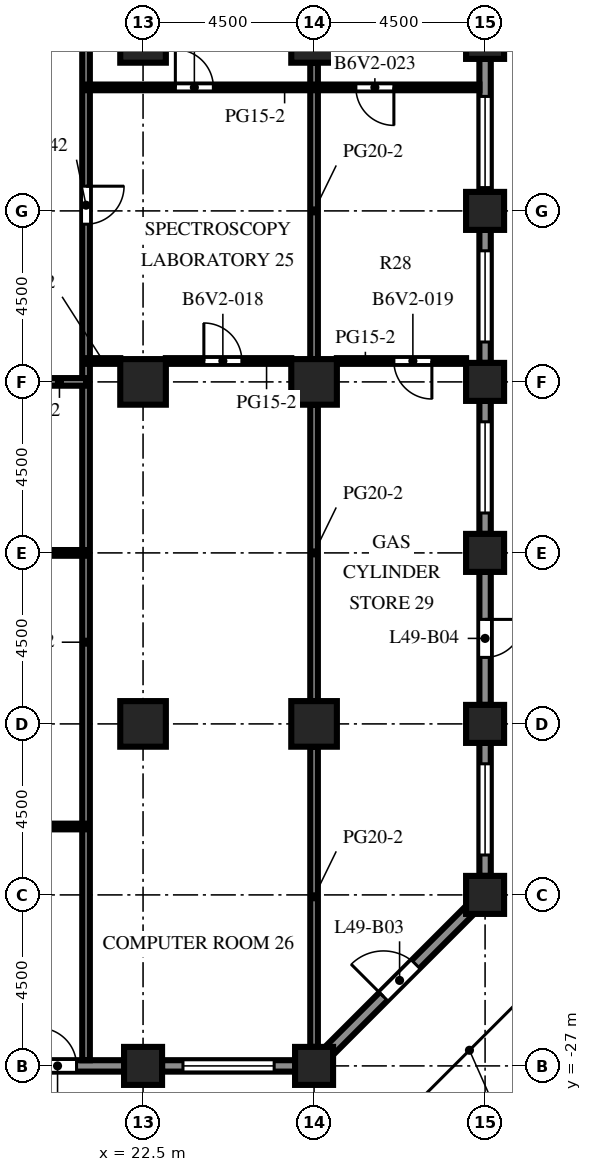
"""IFC4 building model, lengths in metres.
Left out: names, types, materials, properties, quantities, classifications, styles, units other than length and angle.
Written with IfcOpenShell. Run it as: python <this file> out.ifc"""

import sys

from ifc_helpers import new_model, si_unit, direction, frame, frame_2d, origin, origin_2d, place, context, subcontext, project, spatial, rectangle, extrude, element, fill, save


model = new_model("IFC4")
c1 = context("Model", 3, precision=1e-05, world=origin(), true_north=direction((0.0, 1.0)))
c2 = subcontext(c1, "Body", "Model", "MODEL_VIEW")
j1 = project(units=[si_unit("LENGTHUNIT", "METRE"), si_unit("PLANEANGLEUNIT", "RADIAN")], contexts=[c1])
p1 = place(None, origin())
s1 = spatial("IfcSite", under=j1, at=p1, CompositionType="ELEMENT")
p2 = place(p1, origin())
s2 = spatial("IfcBuilding", under=s1, at=p2, CompositionType="ELEMENT")
p3 = place(p2, frame((0.0, 0.0, 216.1)))
s3 = spatial("IfcBuildingStorey", under=s2, at=p3, CompositionType="ELEMENT", Elevation=216.1)
for number, where, z_axis, x_axis in (
    (1, (22.5, -27.0, 0.0), (0.0, 0.0, 1.0), (1.0, 0.0, 0.0)),
    (2, (27.0, -27.0, 0.0), (0.0, 0.0, 1.0), (1.0, 0.0, 0.0)),
    (3, (31.5, -22.5, 0.0), (0.0, 0.0, 1.0), (1.0, 0.0, 0.0)),
    (4, (31.5, -18.0, 0.0), (0.0, 0.0, 1.0), (1.0, 0.0, 0.0)),
    (5, (31.5, -13.5, 0.0), (0.0, 0.0, 1.0), (1.0, 0.0, 0.0)),
    (6, (31.5, -9.0, 0.0), (0.0, 0.0, 1.0), (1.0, 0.0, 0.0)),
    (7, (31.5, -4.5, 0.0), (0.0, 0.0, 1.0), (1.0, 0.0, 0.0)),
    (8, (31.5, 0.0, 0.0), (0.0, 0.0, 1.0), (1.0, 0.0, 0.0)),
):
    element("IfcColumn", number, at=place(p3, frame(where, z_axis=z_axis, x_axis=x_axis)), inside=s3, PredefinedType="COLUMN", context=c2, shape_type="SweptSolid", body=[
        extrude(rectangle(XDim=1.0, YDim=1.0, at=origin_2d()), origin(), (0.0, 0.0, 1.0), 4.1),
    ])
for number, where, z_axis, x_axis in (
    (9, (22.5, -18.0, 0.0), (0.0, 0.0, 1.0), (1.0, 0.0, 0.0)),
    (10, (22.5, -9.0, 0.0), (0.0, 0.0, 1.0), (1.0, 0.0, 0.0)),
    (11, (22.5, 0.0, 0.0), (0.0, 0.0, 1.0), (1.0, 0.0, 0.0)),
    (12, (27.0, -18.0, 0.0), (0.0, 0.0, 1.0), (1.0, 0.0, 0.0)),
    (13, (27.0, -9.0, 0.0), (0.0, 0.0, 1.0), (1.0, 0.0, 0.0)),
    (14, (27.0, 0.0, 0.0), (0.0, 0.0, 1.0), (1.0, 0.0, 0.0)),
):
    element("IfcColumn", number, at=place(p3, frame(where, z_axis=z_axis, x_axis=x_axis)), inside=s3, PredefinedType="COLUMN", context=c2, shape_type="SweptSolid", body=[
        extrude(rectangle(XDim=1.2, YDim=1.2, at=origin_2d()), origin(), (0.0, 0.0, 1.0), 4.1),
    ])
p4 = place(p3, frame((22.0, -27.0, 0.0), z_axis=(0.0, 0.0, 1.0), x_axis=(-1.0, 0.0, 0.0)))
e15 = element("IfcWall", 15, at=p4, inside=s3, PredefinedType="SOLIDWALL", context=c2, shape_type="SweptSolid", body=[
    extrude(rectangle(XDim=3.5, YDim=0.3, at=frame_2d((1.75, 0.0))), origin(), (0.0, 0.0, 1.0), 2.7),
])
p5 = place(p4, frame((1.25, 0.0, 0.0)))
e16 = element("IfcOpeningElement", 16, at=p5, cuts=e15, PredefinedType="OPENING", context=c2, shape_type="SweptSolid", body=[
    extrude(rectangle(XDim=1.0, YDim=2.2, at=frame_2d((0.5, 1.1))), frame((0.0, 0.16, 0.0), z_axis=(0.0, -1.0, 0.0), x_axis=(1.0, 0.0, 0.0)), (0.0, 0.0, 1.0), 0.32),
])
p6 = place(p3, frame((26.5, -27.0, 0.0), z_axis=(0.0, 0.0, 1.0), x_axis=(-1.0, 0.0, 0.0)))
e17 = element("IfcWall", 17, at=p6, inside=s3, PredefinedType="SOLIDWALL", context=c2, shape_type="SweptSolid", body=[
    extrude(rectangle(XDim=3.5, YDim=0.3, at=frame_2d((1.75, 0.0))), origin(), (0.0, 0.0, 1.0), 2.7),
])
p7 = place(p6, frame((0.55, 0.0, 0.8)))
e18 = element("IfcOpeningElement", 18, at=p7, cuts=e17, PredefinedType="OPENING", context=c2, shape_type="SweptSolid", body=[
    extrude(rectangle(XDim=2.4, YDim=1.7, at=frame_2d((1.2, 0.85))), frame((0.0, 0.16, 0.0), z_axis=(0.0, -1.0, 0.0), x_axis=(1.0, 0.0, 0.0)), (0.0, 0.0, 1.0), 0.32),
])
p8 = place(p3, frame((31.106, -22.894, 0.0), z_axis=(0.0, 0.0, 1.0), x_axis=(-0.707106781187, -0.707106781187, 0.0)))
e19 = element("IfcWall", 19, at=p8, inside=s3, PredefinedType="SOLIDWALL", context=c2, shape_type="SweptSolid", body=[
    extrude(rectangle(XDim=5.25, YDim=0.3, at=frame_2d((2.625, 0.0))), origin(), (0.0, 0.0, 1.0), 2.7),
])
p9 = place(p8, frame((2.025, 0.0, 0.0)))
e20 = element("IfcOpeningElement", 20, at=p9, cuts=e19, PredefinedType="OPENING", context=c2, shape_type="SweptSolid", body=[
    extrude(rectangle(XDim=1.2, YDim=2.2, at=frame_2d((0.6, 1.1))), frame((0.0, 0.16, 0.0), z_axis=(0.0, -1.0, 0.0), x_axis=(1.0, 0.0, 0.0)), (0.0, 0.0, 1.0), 0.32),
])
p10 = place(p3, frame((31.5, -18.5, 0.0), z_axis=(0.0, 0.0, 1.0), x_axis=(0.0, -1.0, 0.0)))
e21 = element("IfcWall", 21, at=p10, inside=s3, PredefinedType="SOLIDWALL", context=c2, shape_type="SweptSolid", body=[
    extrude(rectangle(XDim=3.5, YDim=0.3, at=frame_2d((1.75, 0.0))), origin(), (0.0, 0.0, 1.0), 2.7),
])
p11 = place(p10, frame((0.55, 0.0, 0.8)))
e22 = element("IfcOpeningElement", 22, at=p11, cuts=e21, PredefinedType="OPENING", context=c2, shape_type="SweptSolid", body=[
    extrude(rectangle(XDim=2.4, YDim=1.7, at=frame_2d((1.2, 0.85))), frame((0.0, 0.16, 0.0), z_axis=(0.0, -1.0, 0.0), x_axis=(1.0, 0.0, 0.0)), (0.0, 0.0, 1.0), 0.32),
])
p12 = place(p3, frame((31.5, -14.0, 0.0), z_axis=(0.0, 0.0, 1.0), x_axis=(0.0, -1.0, 0.0)))
e23 = element("IfcWall", 23, at=p12, inside=s3, PredefinedType="SOLIDWALL", context=c2, shape_type="SweptSolid", body=[
    extrude(rectangle(XDim=3.5, YDim=0.3, at=frame_2d((1.75, 0.0))), origin(), (0.0, 0.0, 1.0), 2.7),
])
p13 = place(p12, frame((1.25, 0.0, 0.0)))
e24 = element("IfcOpeningElement", 24, at=p13, cuts=e23, PredefinedType="OPENING", context=c2, shape_type="SweptSolid", body=[
    extrude(rectangle(XDim=1.0, YDim=2.2, at=frame_2d((0.5, 1.1))), frame((0.0, 0.16, 0.0), z_axis=(0.0, -1.0, 0.0), x_axis=(1.0, 0.0, 0.0)), (0.0, 0.0, 1.0), 0.32),
])
p14 = place(p3, frame((31.5, -9.5, 0.0), z_axis=(0.0, 0.0, 1.0), x_axis=(0.0, -1.0, 0.0)))
e25 = element("IfcWall", 25, at=p14, inside=s3, PredefinedType="SOLIDWALL", context=c2, shape_type="SweptSolid", body=[
    extrude(rectangle(XDim=3.5, YDim=0.3, at=frame_2d((1.75, 0.0))), origin(), (0.0, 0.0, 1.0), 2.7),
])
p15 = place(p14, frame((0.55, 0.0, 0.8)))
e26 = element("IfcOpeningElement", 26, at=p15, cuts=e25, PredefinedType="OPENING", context=c2, shape_type="SweptSolid", body=[
    extrude(rectangle(XDim=2.4, YDim=1.7, at=frame_2d((1.2, 0.85))), frame((0.0, 0.16, 0.0), z_axis=(0.0, -1.0, 0.0), x_axis=(1.0, 0.0, 0.0)), (0.0, 0.0, 1.0), 0.32),
])
p16 = place(p3, frame((31.5, -5.0, 0.0), z_axis=(0.0, 0.0, 1.0), x_axis=(0.0, -1.0, 0.0)))
e27 = element("IfcWall", 27, at=p16, inside=s3, PredefinedType="SOLIDWALL", context=c2, shape_type="SweptSolid", body=[
    extrude(rectangle(XDim=3.5, YDim=0.3, at=frame_2d((1.75, 0.0))), origin(), (0.0, 0.0, 1.0), 2.7),
])
p17 = place(p16, frame((0.55, 0.0, 0.8)))
e28 = element("IfcOpeningElement", 28, at=p17, cuts=e27, PredefinedType="OPENING", context=c2, shape_type="SweptSolid", body=[
    extrude(rectangle(XDim=2.4, YDim=1.7, at=frame_2d((1.2, 0.85))), frame((0.0, 0.16, 0.0), z_axis=(0.0, -1.0, 0.0), x_axis=(1.0, 0.0, 0.0)), (0.0, 0.0, 1.0), 0.32),
])
p18 = place(p3, frame((31.5, -0.5, 0.0), z_axis=(0.0, 0.0, 1.0), x_axis=(0.0, -1.0, 0.0)))
e29 = element("IfcWall", 29, at=p18, inside=s3, PredefinedType="SOLIDWALL", context=c2, shape_type="SweptSolid", body=[
    extrude(rectangle(XDim=3.5, YDim=0.3, at=frame_2d((1.75, 0.0))), origin(), (0.0, 0.0, 1.0), 2.7),
])
p19 = place(p18, frame((0.988, 0.0, 0.8)))
e30 = element("IfcOpeningElement", 30, at=p19, cuts=e29, PredefinedType="OPENING", context=c2, shape_type="SweptSolid", body=[
    extrude(rectangle(XDim=2.4, YDim=1.7, at=frame_2d((1.2, 0.85))), frame((0.0, 0.16, 0.0), z_axis=(0.0, -1.0, 0.0), x_axis=(1.0, 0.0, 0.0)), (0.0, 0.0, 1.0), 0.32),
])
p20 = place(p3, frame((21.0, 3.25, 0.0), z_axis=(0.0, 0.0, 1.0), x_axis=(0.0, -1.0, 0.0)))
e31 = element("IfcWall", 31, at=p20, inside=s3, PredefinedType="PARTITIONING", context=c2, shape_type="SweptSolid", body=[
    extrude(rectangle(XDim=30.1, YDim=0.2, at=frame_2d((15.05, 0.0))), origin(), (0.0, 0.0, 1.0), 3.5),
])
p21 = place(p20, frame((7.1, 0.0, 0.0)))
e32 = element("IfcOpeningElement", 32, at=p21, cuts=e31, PredefinedType="OPENING", context=c2, shape_type="SweptSolid", body=[
    extrude(rectangle(XDim=1.0, YDim=2.1, at=frame_2d((0.5, 1.05))), frame((0.0, 0.11, 0.0), z_axis=(0.0, -1.0, 0.0), x_axis=(1.0, 0.0, 0.0)), (0.0, 0.0, 1.0), 0.22),
])
p22 = place(p3, frame((27.0, -26.5, 0.0), z_axis=(0.0, 0.0, 1.0), x_axis=(0.0, 1.0, 0.0)))
e33 = element("IfcWall", 33, at=p22, inside=s3, PredefinedType="PARTITIONING", context=c2, shape_type="SweptSolid", body=[
    extrude(rectangle(XDim=7.9, YDim=0.2, at=frame_2d((3.95, 0.0))), origin(), (0.0, 0.0, 1.0), 3.5),
])
for number, where, z_axis, x_axis in (
    (34, (27.0, -17.4, 0.0), (0.0, 0.0, 1.0), (0.0, 1.0, 0.0)),
    (35, (27.0, -8.4, 0.0), (0.0, 0.0, 1.0), (0.0, 1.0, 0.0)),
):
    element("IfcWall", number, at=place(p3, frame(where, z_axis=z_axis, x_axis=x_axis)), inside=s3, PredefinedType="PARTITIONING", context=c2, shape_type="SweptSolid", body=[
        extrude(rectangle(XDim=7.8, YDim=0.2, at=frame_2d((3.9, 0.0))), origin(), (0.0, 0.0, 1.0), 3.5),
    ])
p23 = place(p3, frame((21.0, -20.7, 0.0), z_axis=(0.0, 0.0, 1.0), x_axis=(-1.0, 0.0, 0.0)))
e36 = element("IfcWall", 36, at=p23, inside=s3, PredefinedType="PARTITIONING", context=c2, shape_type="SweptSolid", body=[
    extrude(rectangle(XDim=34.5, YDim=0.15, at=frame_2d((17.25, 0.0))), origin(), (0.0, 0.0, 1.0), 3.5),
])
p24 = place(p23, frame((31.15, 0.0, 0.0)))
e37 = element("IfcOpeningElement", 37, at=p24, cuts=e36, PredefinedType="OPENING", context=c2, shape_type="SweptSolid", body=[
    extrude(rectangle(XDim=1.0, YDim=2.1, at=frame_2d((0.5, 1.05))), frame((0.0, 0.085, 0.0), z_axis=(0.0, -1.0, 0.0), x_axis=(1.0, 0.0, 0.0)), (0.0, 0.0, 1.0), 0.17),
])
p25 = place(p23, frame((25.65, 0.0, 0.0)))
e38 = element("IfcOpeningElement", 38, at=p25, cuts=e36, PredefinedType="OPENING", context=c2, shape_type="SweptSolid", body=[
    extrude(rectangle(XDim=1.0, YDim=2.1, at=frame_2d((0.5, 1.05))), frame((0.0, 0.085, 0.0), z_axis=(0.0, -1.0, 0.0), x_axis=(1.0, 0.0, 0.0)), (0.0, 0.0, 1.0), 0.17),
])
p26 = place(p23, frame((18.65, 0.0, 0.0)))
e39 = element("IfcOpeningElement", 39, at=p26, cuts=e36, PredefinedType="OPENING", context=c2, shape_type="SweptSolid", body=[
    extrude(rectangle(XDim=1.0, YDim=2.1, at=frame_2d((0.5, 1.05))), frame((0.0, 0.085, 0.0), z_axis=(0.0, -1.0, 0.0), x_axis=(1.0, 0.0, 0.0)), (0.0, 0.0, 1.0), 0.17),
])
p27 = place(p23, frame((7.65, 0.0, 0.0)))
e40 = element("IfcOpeningElement", 40, at=p27, cuts=e36, PredefinedType="OPENING", context=c2, shape_type="SweptSolid", body=[
    extrude(rectangle(XDim=1.0, YDim=2.1, at=frame_2d((0.5, 1.05))), frame((0.0, 0.085, 0.0), z_axis=(0.0, -1.0, 0.0), x_axis=(1.0, 0.0, 0.0)), (0.0, 0.0, 1.0), 0.17),
])
p28 = place(p3, frame((21.0, -13.5, 0.0), z_axis=(0.0, 0.0, 1.0), x_axis=(-1.0, 0.0, 0.0)))
e41 = element("IfcWall", 41, at=p28, inside=s3, PredefinedType="PARTITIONING", context=c2, shape_type="SweptSolid", body=[
    extrude(rectangle(XDim=34.5, YDim=0.15, at=frame_2d((17.25, 0.0))), origin(), (0.0, 0.0, 1.0), 3.5),
])
p29 = place(p28, frame((31.4, 0.0, 0.0)))
e42 = element("IfcOpeningElement", 42, at=p29, cuts=e41, PredefinedType="OPENING", context=c2, shape_type="SweptSolid", body=[
    extrude(rectangle(XDim=1.0, YDim=2.1, at=frame_2d((0.5, 1.05))), frame((0.0, 0.085, 0.0), z_axis=(0.0, -1.0, 0.0), x_axis=(1.0, 0.0, 0.0)), (0.0, 0.0, 1.0), 0.17),
])
p30 = place(p28, frame((24.15, 0.0, 0.0)))
e43 = element("IfcOpeningElement", 43, at=p30, cuts=e41, PredefinedType="OPENING", context=c2, shape_type="SweptSolid", body=[
    extrude(rectangle(XDim=1.0, YDim=2.1, at=frame_2d((0.5, 1.05))), frame((0.0, 0.085, 0.0), z_axis=(0.0, -1.0, 0.0), x_axis=(1.0, 0.0, 0.0)), (0.0, 0.0, 1.0), 0.17),
])
p31 = place(p28, frame((17.65, 0.0, 0.0)))
e44 = element("IfcOpeningElement", 44, at=p31, cuts=e41, PredefinedType="OPENING", context=c2, shape_type="SweptSolid", body=[
    extrude(rectangle(XDim=1.0, YDim=2.1, at=frame_2d((0.5, 1.05))), frame((0.0, 0.085, 0.0), z_axis=(0.0, -1.0, 0.0), x_axis=(1.0, 0.0, 0.0)), (0.0, 0.0, 1.0), 0.17),
])
p32 = place(p28, frame((7.65, 0.0, 0.0)))
e45 = element("IfcOpeningElement", 45, at=p32, cuts=e41, PredefinedType="OPENING", context=c2, shape_type="SweptSolid", body=[
    extrude(rectangle(XDim=1.0, YDim=2.1, at=frame_2d((0.5, 1.05))), frame((0.0, 0.085, 0.0), z_axis=(0.0, -1.0, 0.0), x_axis=(1.0, 0.0, 0.0)), (0.0, 0.0, 1.0), 0.17),
])
p33 = place(p3, frame((21.0, -9.0, 0.0), z_axis=(0.0, 0.0, 1.0), x_axis=(-1.0, 0.0, 0.0)))
e46 = element("IfcWall", 46, at=p33, inside=s3, PredefinedType="PARTITIONING", context=c2, shape_type="SweptSolid", body=[
    extrude(rectangle(XDim=3.0, YDim=0.2, at=frame_2d((1.5, 0.0))), origin(), (0.0, 0.0, 1.0), 3.5),
])
p34 = place(p33, frame((1.4, 0.0, 0.0)))
e47 = element("IfcOpeningElement", 47, at=p34, cuts=e46, PredefinedType="OPENING", context=c2, shape_type="SweptSolid", body=[
    extrude(rectangle(XDim=1.0, YDim=2.1, at=frame_2d((0.5, 1.05))), frame((0.0, 0.11, 0.0), z_axis=(0.0, -1.0, 0.0), x_axis=(1.0, 0.0, 0.0)), (0.0, 0.0, 1.0), 0.22),
])
p35 = place(p3, frame((21.0, -8.45, 0.0), z_axis=(0.0, 0.0, 1.0), x_axis=(1.0, 0.0, 0.0)))
e48 = element("IfcWall", 48, at=p35, inside=s3, PredefinedType="PARTITIONING", context=c2, shape_type="SweptSolid", body=[
    extrude(rectangle(XDim=0.9, YDim=0.15, at=frame_2d((0.45, 0.0))), origin(), (0.0, 0.0, 1.0), 3.5),
])
p36 = place(p3, frame((26.4, -8.45, 0.0), z_axis=(0.0, 0.0, 1.0), x_axis=(-1.0, 0.0, 0.0)))
e49 = element("IfcWall", 49, at=p36, inside=s3, PredefinedType="PARTITIONING", context=c2, shape_type="SweptSolid", body=[
    extrude(rectangle(XDim=3.3, YDim=0.15, at=frame_2d((1.65, 0.0))), origin(), (0.0, 0.0, 1.0), 3.5),
])
p37 = place(p36, frame((1.3, 0.0, 0.0)))
e50 = element("IfcOpeningElement", 50, at=p37, cuts=e49, PredefinedType="OPENING", context=c2, shape_type="SweptSolid", body=[
    extrude(rectangle(XDim=1.0, YDim=2.1, at=frame_2d((0.5, 1.05))), frame((0.0, 0.085, 0.0), z_axis=(0.0, -1.0, 0.0), x_axis=(1.0, 0.0, 0.0)), (0.0, 0.0, 1.0), 0.17),
])
p38 = place(p3, frame((31.0, -8.45, 0.0), z_axis=(0.0, 0.0, 1.0), x_axis=(-1.0, 0.0, 0.0)))
e51 = element("IfcWall", 51, at=p38, inside=s3, PredefinedType="PARTITIONING", context=c2, shape_type="SweptSolid", body=[
    extrude(rectangle(XDim=3.4, YDim=0.15, at=frame_2d((1.7, 0.0))), origin(), (0.0, 0.0, 1.0), 3.5),
])
p39 = place(p38, frame((0.9, 0.0, 0.0)))
e52 = element("IfcOpeningElement", 52, at=p39, cuts=e51, PredefinedType="OPENING", context=c2, shape_type="SweptSolid", body=[
    extrude(rectangle(XDim=1.0, YDim=2.1, at=frame_2d((0.5, 1.05))), frame((0.0, 0.085, 0.0), z_axis=(0.0, -1.0, 0.0), x_axis=(1.0, 0.0, 0.0)), (0.0, 0.0, 1.0), 0.17),
])
p40 = place(p3, frame((21.0, -1.25, 0.0), z_axis=(0.0, 0.0, 1.0), x_axis=(1.0, 0.0, 0.0)))
e53 = element("IfcWall", 53, at=p40, inside=s3, PredefinedType="PARTITIONING", context=c2, shape_type="SweptSolid", body=[
    extrude(rectangle(XDim=10.35, YDim=0.15, at=frame_2d((5.175, 0.0))), origin(), (0.0, 0.0, 1.0), 3.5),
])
p41 = place(p40, frame((2.35, 0.0, 0.0)))
e54 = element("IfcOpeningElement", 54, at=p41, cuts=e53, PredefinedType="OPENING", context=c2, shape_type="SweptSolid", body=[
    extrude(rectangle(XDim=1.0, YDim=2.1, at=frame_2d((0.5, 1.05))), frame((0.0, 0.085, 0.0), z_axis=(0.0, -1.0, 0.0), x_axis=(1.0, 0.0, 0.0)), (0.0, 0.0, 1.0), 0.17),
])
p42 = place(p40, frame((7.1, 0.0, 0.0)))
e55 = element("IfcOpeningElement", 55, at=p42, cuts=e53, PredefinedType="OPENING", context=c2, shape_type="SweptSolid", body=[
    extrude(rectangle(XDim=1.0, YDim=2.1, at=frame_2d((0.5, 1.05))), frame((0.0, 0.085, 0.0), z_axis=(0.0, -1.0, 0.0), x_axis=(1.0, 0.0, 0.0)), (0.0, 0.0, 1.0), 0.17),
])
p43 = place(p5, origin())
e56 = element("IfcDoor", 56, at=p43, inside=s3, OperationType="SINGLE_SWING_RIGHT", PredefinedType="DOOR", context=c2, shape_type="SweptSolid", body=[
    extrude(rectangle(XDim=1.0, YDim=2.2, at=frame_2d((0.5, 1.1))), frame((0.0, 0.025, 0.0), z_axis=(0.0, -1.0, 0.0), x_axis=(1.0, 0.0, 0.0)), (0.0, 0.0, 1.0), 0.05),
])
fill(e16, e56)
p44 = place(p7, origin())
e57 = element("IfcWindow", 57, at=p44, inside=s3, PartitioningType="SINGLE_PANEL", PredefinedType="WINDOW", context=c2, shape_type="SweptSolid", body=[
    extrude(rectangle(XDim=2.4, YDim=1.7, at=frame_2d((1.2, 0.85))), frame((0.0, 0.03, 0.0), z_axis=(0.0, -1.0, 0.0), x_axis=(1.0, 0.0, 0.0)), (0.0, 0.0, 1.0), 0.06),
])
fill(e18, e57)
p45 = place(p9, origin())
e58 = element("IfcDoor", 58, at=p45, inside=s3, OperationType="SINGLE_SWING_RIGHT", PredefinedType="DOOR", context=c2, shape_type="SweptSolid", body=[
    extrude(rectangle(XDim=1.2, YDim=2.2, at=frame_2d((0.6, 1.1))), frame((0.0, 0.025, 0.0), z_axis=(0.0, -1.0, 0.0), x_axis=(1.0, 0.0, 0.0)), (0.0, 0.0, 1.0), 0.05),
])
fill(e20, e58)
p46 = place(p11, origin())
e59 = element("IfcWindow", 59, at=p46, inside=s3, PartitioningType="SINGLE_PANEL", PredefinedType="WINDOW", context=c2, shape_type="SweptSolid", body=[
    extrude(rectangle(XDim=2.4, YDim=1.7, at=frame_2d((1.2, 0.85))), frame((0.0, 0.03, 0.0), z_axis=(0.0, -1.0, 0.0), x_axis=(1.0, 0.0, 0.0)), (0.0, 0.0, 1.0), 0.06),
])
fill(e22, e59)
p47 = place(p13, origin())
e60 = element("IfcDoor", 60, at=p47, inside=s3, OperationType="SINGLE_SWING_LEFT", PredefinedType="DOOR", context=c2, shape_type="SweptSolid", body=[
    extrude(rectangle(XDim=1.0, YDim=2.2, at=frame_2d((0.5, 1.1))), frame((0.0, 0.025, 0.0), z_axis=(0.0, -1.0, 0.0), x_axis=(1.0, 0.0, 0.0)), (0.0, 0.0, 1.0), 0.05),
])
fill(e24, e60)
p48 = place(p15, origin())
e61 = element("IfcWindow", 61, at=p48, inside=s3, PartitioningType="SINGLE_PANEL", PredefinedType="WINDOW", context=c2, shape_type="SweptSolid", body=[
    extrude(rectangle(XDim=2.4, YDim=1.7, at=frame_2d((1.2, 0.85))), frame((0.0, 0.03, 0.0), z_axis=(0.0, -1.0, 0.0), x_axis=(1.0, 0.0, 0.0)), (0.0, 0.0, 1.0), 0.06),
])
fill(e26, e61)
p49 = place(p17, origin())
e62 = element("IfcWindow", 62, at=p49, inside=s3, PartitioningType="SINGLE_PANEL", PredefinedType="WINDOW", context=c2, shape_type="SweptSolid", body=[
    extrude(rectangle(XDim=2.4, YDim=1.7, at=frame_2d((1.2, 0.85))), frame((0.0, 0.03, 0.0), z_axis=(0.0, -1.0, 0.0), x_axis=(1.0, 0.0, 0.0)), (0.0, 0.0, 1.0), 0.06),
])
fill(e28, e62)
p50 = place(p19, origin())
e63 = element("IfcWindow", 63, at=p50, inside=s3, PartitioningType="SINGLE_PANEL", PredefinedType="WINDOW", context=c2, shape_type="SweptSolid", body=[
    extrude(rectangle(XDim=2.4, YDim=1.7, at=frame_2d((1.2, 0.85))), frame((0.0, 0.03, 0.0), z_axis=(0.0, -1.0, 0.0), x_axis=(1.0, 0.0, 0.0)), (0.0, 0.0, 1.0), 0.06),
])
fill(e30, e63)
p51 = place(p37, origin())
e64 = element("IfcDoor", 64, at=p51, inside=s3, OperationType="SINGLE_SWING_RIGHT", PredefinedType="DOOR", context=c2, shape_type="SweptSolid", body=[
    extrude(rectangle(XDim=1.0, YDim=2.1, at=frame_2d((0.5, 1.05))), frame((0.0, 0.025, 0.0), z_axis=(0.0, -1.0, 0.0), x_axis=(1.0, 0.0, 0.0)), (0.0, 0.0, 1.0), 0.05),
])
fill(e50, e64)
p52 = place(p39, origin())
e65 = element("IfcDoor", 65, at=p52, inside=s3, OperationType="SINGLE_SWING_LEFT", PredefinedType="DOOR", context=c2, shape_type="SweptSolid", body=[
    extrude(rectangle(XDim=1.0, YDim=2.1, at=frame_2d((0.5, 1.05))), frame((0.0, 0.025, 0.0), z_axis=(0.0, -1.0, 0.0), x_axis=(1.0, 0.0, 0.0)), (0.0, 0.0, 1.0), 0.05),
])
fill(e52, e65)
p53 = place(p41, origin())
e66 = element("IfcDoor", 66, at=p53, inside=s3, OperationType="SINGLE_SWING_LEFT", PredefinedType="DOOR", context=c2, shape_type="SweptSolid", body=[
    extrude(rectangle(XDim=1.0, YDim=2.1, at=frame_2d((0.5, 1.05))), frame((0.0, 0.025, 0.0), z_axis=(0.0, -1.0, 0.0), x_axis=(1.0, 0.0, 0.0)), (0.0, 0.0, 1.0), 0.05),
])
fill(e54, e66)
p54 = place(p42, origin())
e67 = element("IfcDoor", 67, at=p54, inside=s3, OperationType="SINGLE_SWING_RIGHT", PredefinedType="DOOR", context=c2, shape_type="SweptSolid", body=[
    extrude(rectangle(XDim=1.0, YDim=2.1, at=frame_2d((0.5, 1.05))), frame((0.0, 0.025, 0.0), z_axis=(0.0, -1.0, 0.0), x_axis=(1.0, 0.0, 0.0)), (0.0, 0.0, 1.0), 0.05),
])
fill(e55, e67)
p55 = place(p21, origin())
e68 = element("IfcDoor", 68, at=p55, inside=s3, OperationType="SINGLE_SWING_LEFT", PredefinedType="DOOR", context=c2, shape_type="SweptSolid", body=[
    extrude(rectangle(XDim=1.0, YDim=2.1, at=frame_2d((0.5, 1.05))), frame((0.0, 0.025, 0.0), z_axis=(0.0, -1.0, 0.0), x_axis=(1.0, 0.0, 0.0)), (0.0, 0.0, 1.0), 0.05),
])
fill(e32, e68)
save(model, sys.argv[1])
